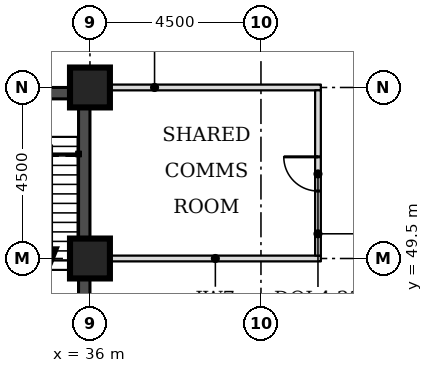
"""IFC4 building model, lengths in metres.
Left out: names, types, materials, properties, quantities, classifications, styles, units other than length and angle.
Written with IfcOpenShell. Run it as: python <this file> out.ifc"""

import sys

from ifc_helpers import new_model, si_unit, direction, frame, frame_2d, origin, origin_2d, place, context, subcontext, project, spatial, rectangle, extrude, element, fill, save


model = new_model("IFC4")
c1 = context("Model", 3, precision=1e-05, world=origin(), true_north=direction((0.0, 1.0)))
c2 = subcontext(c1, "Body", "Model", "MODEL_VIEW")
j1 = project(units=[si_unit("LENGTHUNIT", "METRE"), si_unit("PLANEANGLEUNIT", "RADIAN")], contexts=[c1])
p1 = place(None, origin())
s1 = spatial("IfcSite", under=j1, at=p1, CompositionType="ELEMENT")
p2 = place(p1, origin())
s2 = spatial("IfcBuilding", under=s1, at=p2, CompositionType="ELEMENT")
p3 = place(p2, frame((0.0, 0.0, 101.1)))
s3 = spatial("IfcBuildingStorey", under=s2, at=p3, CompositionType="ELEMENT", Elevation=101.1)
for number, where, z_axis, x_axis in (
    (1, (36.0, 49.5, 0.0), (0.0, 0.0, 1.0), (1.0, 0.0, 0.0)),
    (2, (36.0, 54.0, 0.0), (0.0, 0.0, 1.0), (1.0, 0.0, 0.0)),
):
    element("IfcColumn", number, at=place(p3, frame(where, z_axis=z_axis, x_axis=x_axis)), inside=s3, PredefinedType="COLUMN", context=c2, shape_type="SweptSolid", body=[
        extrude(rectangle(XDim=1.05, YDim=1.05, at=origin_2d()), origin(), (0.0, 0.0, 1.0), 3.7),
    ])
p4 = place(p3, frame((27.3, 53.85, 0.0), z_axis=(0.0, 0.0, 1.0), x_axis=(1.0, 0.0, 0.0)))
e3 = element("IfcWall", 3, at=p4, inside=s3, PredefinedType="SHEAR", context=c2, shape_type="SweptSolid", body=[
    extrude(rectangle(XDim=8.4, YDim=0.3, at=frame_2d((4.2, 0.0))), origin(), (0.0, 0.0, 1.0), 3.7),
])
p5 = place(p4, frame((6.4, 0.0, 0.0)))
e4 = element("IfcOpeningElement", 4, at=p5, cuts=e3, PredefinedType="OPENING", context=c2, shape_type="SweptSolid", body=[
    extrude(rectangle(XDim=1.1, YDim=2.1, at=frame_2d((0.55, 1.05))), frame((0.0, 0.16, 0.0), z_axis=(0.0, -1.0, 0.0), x_axis=(1.0, 0.0, 0.0)), (0.0, 0.0, 1.0), 0.32),
])
p6 = place(p3, frame((35.85, 45.0, 0.0), z_axis=(0.0, 0.0, 1.0), x_axis=(0.0, 1.0, 0.0)))
e5 = element("IfcWall", 5, at=p6, inside=s3, PredefinedType="SHEAR", context=c2, shape_type="SweptSolid", body=[
    extrude(rectangle(XDim=9.0, YDim=0.3, at=frame_2d((4.5, 0.0))), origin(), (0.0, 0.0, 1.0), 3.7),
])
for number, where, z_axis, x_axis in (
    (6, (36.525, 49.5, 0.0), (0.0, 0.0, 1.0), (1.0, 0.0, 0.0)),
    (7, (36.525, 54.0, 0.0), (0.0, 0.0, 1.0), (1.0, 0.0, 0.0)),
):
    element("IfcWall", number, at=place(p3, frame(where, z_axis=z_axis, x_axis=x_axis)), inside=s3, PredefinedType="PARTITIONING", context=c2, shape_type="SweptSolid", body=[
        extrude(rectangle(XDim=5.55, YDim=0.15, at=frame_2d((2.775, 0.0))), origin(), (0.0, 0.0, 1.0), 3.55),
    ])
p7 = place(p3, frame((42.0, 49.575, 0.0), z_axis=(0.0, 0.0, 1.0), x_axis=(0.0, 1.0, 0.0)))
e8 = element("IfcWall", 8, at=p7, inside=s3, PredefinedType="PARTITIONING", context=c2, shape_type="SweptSolid", body=[
    extrude(rectangle(XDim=4.35, YDim=0.15, at=frame_2d((2.175, 0.0))), origin(), (0.0, 0.0, 1.0), 3.55),
])
p8 = place(p7, frame((1.7, 0.0, 0.0)))
e9 = element("IfcOpeningElement", 9, at=p8, cuts=e8, PredefinedType="OPENING", context=c2, shape_type="SweptSolid", body=[
    extrude(rectangle(XDim=0.9, YDim=2.1, at=frame_2d((0.45, 1.05))), frame((0.0, 0.085, 0.0), z_axis=(0.0, -1.0, 0.0), x_axis=(1.0, 0.0, 0.0)), (0.0, 0.0, 1.0), 0.17),
])
p9 = place(p8, origin())
e10 = element("IfcDoor", 10, at=p9, inside=s3, OperationType="SINGLE_SWING_RIGHT", PredefinedType="DOOR", context=c2, shape_type="SweptSolid", body=[
    extrude(rectangle(XDim=0.9, YDim=2.1, at=frame_2d((0.45, 1.05))), frame((0.0, 0.025, 0.0), z_axis=(0.0, -1.0, 0.0), x_axis=(1.0, 0.0, 0.0)), (0.0, 0.0, 1.0), 0.05),
])
fill(e9, e10)
save(model, sys.argv[1])
